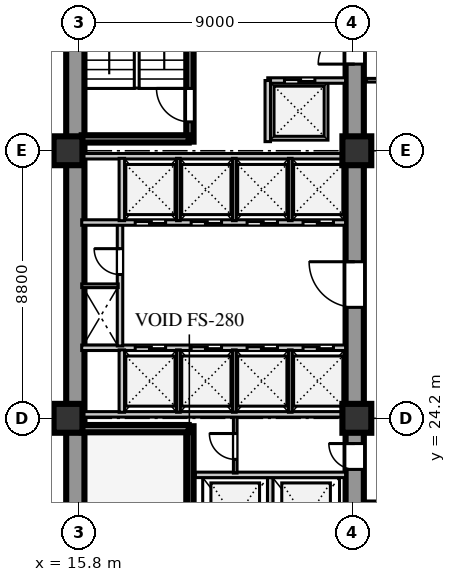
"""IFC4 building model, lengths in metres.
Left out: names, types, materials, properties, quantities, classifications, styles, units other than length and angle.
Written with IfcOpenShell. Run it as: python <this file> out.ifc"""

import sys

from ifc_helpers import new_model, si_unit, direction, frame, frame_2d, origin, origin_2d, place, context, subcontext, project, spatial, rectangle, extrude, element, fill, save


model = new_model("IFC4")
c1 = context("Model", 3, precision=1e-05, world=origin(), true_north=direction((0.0, 1.0)))
c2 = subcontext(c1, "Body", "Model", "MODEL_VIEW")
j1 = project(units=[si_unit("LENGTHUNIT", "METRE"), si_unit("PLANEANGLEUNIT", "RADIAN")], contexts=[c1])
p1 = place(None, origin())
s1 = spatial("IfcSite", under=j1, at=p1, CompositionType="ELEMENT")
p2 = place(p1, origin())
s2 = spatial("IfcBuilding", under=s1, at=p2, CompositionType="ELEMENT")
p3 = place(p2, frame((0.0, 0.0, 26.0)))
s3 = spatial("IfcBuildingStorey", under=s2, at=p3, CompositionType="ELEMENT", Elevation=26.0)
p4 = place(p3, frame((15.69, 15.81, 0.0), z_axis=(0.0, 0.0, 1.0), x_axis=(0.0, 1.0, 0.0)))
e1 = element("IfcWall", 1, at=p4, inside=s3, PredefinedType="SHEAR", context=c2, shape_type="SweptSolid", body=[
    extrude(rectangle(XDim=25.63, YDim=0.6, at=frame_2d((12.815, 0.0))), origin(), (0.0, 0.0, 1.0), 3.72),
])
p5 = place(p3, frame((24.88, 15.74, 0.0), z_axis=(0.0, 0.0, 1.0), x_axis=(0.0, 1.0, 0.0)))
e2 = element("IfcWall", 2, at=p5, inside=s3, PredefinedType="SHEAR", context=c2, shape_type="SweptSolid", body=[
    extrude(rectangle(XDim=25.76, YDim=0.6, at=frame_2d((12.88, 0.0))), origin(), (0.0, 0.0, 1.0), 3.72),
])
p6 = place(p5, frame((1.61, 0.0, 0.0)))
e3 = element("IfcOpeningElement", 3, at=p6, cuts=e2, PredefinedType="OPENING", context=c2, shape_type="SweptSolid", body=[
    extrude(rectangle(XDim=1.2, YDim=2.1, at=frame_2d((0.6, 1.05))), frame((0.0, 0.31, 0.0), z_axis=(0.0, -1.0, 0.0), x_axis=(1.0, 0.0, 0.0)), (0.0, 0.0, 1.0), 0.62),
])
p7 = place(p5, frame((6.78, 0.0, 0.0)))
e4 = element("IfcOpeningElement", 4, at=p7, cuts=e2, PredefinedType="OPENING", context=c2, shape_type="SweptSolid", body=[
    extrude(rectangle(XDim=0.85, YDim=2.06, at=frame_2d((0.425, 1.03))), frame((0.0, 0.31, 0.0), z_axis=(0.0, -1.0, 0.0), x_axis=(1.0, 0.0, 0.0)), (0.0, 0.0, 1.0), 0.62),
])
p8 = place(p5, frame((12.11, 0.0, 0.0)))
e5 = element("IfcOpeningElement", 5, at=p8, cuts=e2, PredefinedType="OPENING", context=c2, shape_type="SweptSolid", body=[
    extrude(rectangle(XDim=1.5, YDim=2.12, at=frame_2d((0.75, 1.06))), frame((0.0, 0.31, 0.0), z_axis=(0.0, -1.0, 0.0), x_axis=(1.0, 0.0, 0.0)), (0.0, 0.0, 1.0), 0.62),
])
p9 = place(p5, frame((20.11, 0.0, 0.0)))
e6 = element("IfcOpeningElement", 6, at=p9, cuts=e2, PredefinedType="OPENING", context=c2, shape_type="SweptSolid", body=[
    extrude(rectangle(XDim=1.2, YDim=2.12, at=frame_2d((0.6, 1.06))), frame((0.0, 0.31, 0.0), z_axis=(0.0, -1.0, 0.0), x_axis=(1.0, 0.0, 0.0)), (0.0, 0.0, 1.0), 0.62),
])
p10 = place(p5, frame((24.01, 0.0, 0.0)))
e7 = element("IfcOpeningElement", 7, at=p10, cuts=e2, PredefinedType="OPENING", context=c2, shape_type="SweptSolid", body=[
    extrude(rectangle(XDim=0.95, YDim=2.1, at=frame_2d((0.475, 1.05))), frame((0.0, 0.31, 0.0), z_axis=(0.0, -1.0, 0.0), x_axis=(1.0, 0.0, 0.0)), (0.0, 0.0, 1.0), 0.62),
])
for number, where, z_axis, x_axis in (
    (8, (15.45, 24.2, 0.0), (0.0, 0.0, 1.0), (1.0, 0.0, 0.0)),
    (9, (15.45, 33.0, 0.0), (0.0, 0.0, 1.0), (1.0, 0.0, 0.0)),
    (10, (24.95, 24.2, 0.0), (0.0, 0.0, 1.0), (1.0, 0.0, 0.0)),
    (11, (24.95, 33.0, 0.0), (0.0, 0.0, 1.0), (1.0, 0.0, 0.0)),
):
    element("IfcColumn", number, at=place(p3, frame(where, z_axis=z_axis, x_axis=x_axis)), inside=s3, PredefinedType="COLUMN", context=c2, shape_type="SweptSolid", body=[
        extrude(rectangle(XDim=0.95, YDim=0.95, at=origin_2d()), origin(), (0.0, 0.0, 1.0), 3.72),
    ])
p11 = place(p3, frame((19.46, 15.74, 0.0), z_axis=(0.0, 0.0, 1.0), x_axis=(0.0, 1.0, 0.0)))
e12 = element("IfcWall", 12, at=p11, inside=s3, PredefinedType="SHEAR", context=c2, shape_type="SweptSolid", body=[
    extrude(rectangle(XDim=8.2, YDim=0.24, at=frame_2d((4.1, 0.0))), origin(), (0.0, 0.0, 1.0), 4.0),
])
p12 = place(p11, frame((0.45, 0.0, 0.0)))
e13 = element("IfcOpeningElement", 13, at=p12, cuts=e12, PredefinedType="OPENING", context=c2, shape_type="SweptSolid", body=[
    extrude(rectangle(XDim=1.1, YDim=2.1, at=frame_2d((0.55, 1.05))), frame((0.0, 0.13, 0.0), z_axis=(0.0, -1.0, 0.0), x_axis=(1.0, 0.0, 0.0)), (0.0, 0.0, 1.0), 0.26),
])
p13 = place(p3, frame((15.9, 23.86, 0.0), z_axis=(0.0, 0.0, 1.0), x_axis=(1.0, 0.0, 0.0)))
e14 = element("IfcWall", 14, at=p13, inside=s3, PredefinedType="SHEAR", context=c2, shape_type="SweptSolid", body=[
    extrude(rectangle(XDim=3.52, YDim=0.24, at=frame_2d((1.76, 0.0))), origin(), (0.0, 0.0, 1.0), 4.0),
])
p14 = place(p3, frame((22.1, 19.51, 0.0), z_axis=(0.0, 0.0, 1.0), x_axis=(0.0, 1.0, 0.0)))
e15 = element("IfcWall", 15, at=p14, inside=s3, PredefinedType="SOLIDWALL", context=c2, shape_type="SweptSolid", body=[
    extrude(rectangle(XDim=2.74, YDim=0.18, at=frame_2d((1.37, 0.0))), origin(), (0.0, 0.0, 1.0), 3.72),
])
p15 = place(p3, frame((19.64, 22.34, 0.0), z_axis=(0.0, 0.0, 1.0), x_axis=(1.0, 0.0, 0.0)))
e16 = element("IfcWall", 16, at=p15, inside=s3, PredefinedType="SOLIDWALL", context=c2, shape_type="SweptSolid", body=[
    extrude(rectangle(XDim=4.94, YDim=0.18, at=frame_2d((2.47, 0.0))), origin(), (0.0, 0.0, 1.0), 3.72),
])
p16 = place(p3, frame((20.95, 22.4, 0.0), z_axis=(0.0, 0.0, 1.0), x_axis=(0.0, 1.0, 0.0)))
e17 = element("IfcWall", 17, at=p16, inside=s3, PredefinedType="PARTITIONING", context=c2, shape_type="SweptSolid", body=[
    extrude(rectangle(XDim=1.88, YDim=0.12, at=frame_2d((0.94, 0.0))), origin(), (0.0, 0.0, 1.0), 3.72),
])
p17 = place(p16, frame((0.45, 0.0, 0.0)))
e18 = element("IfcOpeningElement", 18, at=p17, cuts=e17, PredefinedType="OPENING", context=c2, shape_type="SweptSolid", body=[
    extrude(rectangle(XDim=0.85, YDim=2.06, at=frame_2d((0.425, 1.03))), frame((0.0, 0.07, 0.0), z_axis=(0.0, -1.0, 0.0), x_axis=(1.0, 0.0, 0.0)), (0.0, 0.0, 1.0), 0.14),
])
p18 = place(p3, frame((15.9, 26.52, 0.0), z_axis=(0.0, 0.0, 1.0), x_axis=(1.0, 0.0, 0.0)))
e19 = element("IfcWall", 19, at=p18, inside=s3, PredefinedType="SOLIDWALL", context=c2, shape_type="SweptSolid", body=[
    extrude(rectangle(XDim=8.68, YDim=0.18, at=frame_2d((4.34, 0.0))), origin(), (0.0, 0.0, 1.0), 3.72),
])
p19 = place(p18, frame((1.76, 0.0, 0.0)))
e20 = element("IfcOpeningElement", 20, at=p19, cuts=e19, PredefinedType="OPENING", context=c2, shape_type="SweptSolid", body=[
    extrude(rectangle(XDim=1.0, YDim=2.1, at=frame_2d((0.5, 1.05))), frame((0.0, 0.1, 0.0), z_axis=(0.0, -1.0, 0.0), x_axis=(1.0, 0.0, 0.0)), (0.0, 0.0, 1.0), 0.2),
])
p20 = place(p18, frame((3.6, 0.0, 0.0)))
e21 = element("IfcOpeningElement", 21, at=p20, cuts=e19, PredefinedType="OPENING", context=c2, shape_type="SweptSolid", body=[
    extrude(rectangle(XDim=1.0, YDim=2.1, at=frame_2d((0.5, 1.05))), frame((0.0, 0.1, 0.0), z_axis=(0.0, -1.0, 0.0), x_axis=(1.0, 0.0, 0.0)), (0.0, 0.0, 1.0), 0.2),
])
p21 = place(p18, frame((5.44, 0.0, 0.0)))
e22 = element("IfcOpeningElement", 22, at=p21, cuts=e19, PredefinedType="OPENING", context=c2, shape_type="SweptSolid", body=[
    extrude(rectangle(XDim=1.0, YDim=2.1, at=frame_2d((0.5, 1.05))), frame((0.0, 0.1, 0.0), z_axis=(0.0, -1.0, 0.0), x_axis=(1.0, 0.0, 0.0)), (0.0, 0.0, 1.0), 0.2),
])
p22 = place(p18, frame((7.28, 0.0, 0.0)))
e23 = element("IfcOpeningElement", 23, at=p22, cuts=e19, PredefinedType="OPENING", context=c2, shape_type="SweptSolid", body=[
    extrude(rectangle(XDim=1.0, YDim=2.1, at=frame_2d((0.5, 1.05))), frame((0.0, 0.1, 0.0), z_axis=(0.0, -1.0, 0.0), x_axis=(1.0, 0.0, 0.0)), (0.0, 0.0, 1.0), 0.2),
])
p23 = place(p3, frame((15.9, 24.33, 0.0), z_axis=(0.0, 0.0, 1.0), x_axis=(1.0, 0.0, 0.0)))
e24 = element("IfcWall", 24, at=p23, inside=s3, PredefinedType="SOLIDWALL", context=c2, shape_type="SweptSolid", body=[
    extrude(rectangle(XDim=8.68, YDim=0.18, at=frame_2d((4.34, 0.0))), origin(), (0.0, 0.0, 1.0), 3.02),
])
p24 = place(p3, frame((17.22, 24.4, 0.0), z_axis=(0.0, 0.0, 1.0), x_axis=(0.0, 1.0, 0.0)))
e25 = element("IfcWall", 25, at=p24, inside=s3, PredefinedType="SOLIDWALL", context=c2, shape_type="SweptSolid", body=[
    extrude(rectangle(XDim=2.05, YDim=0.18, at=frame_2d((1.025, 0.0))), origin(), (0.0, 0.0, 1.0), 3.72),
])
for number, where, z_axis, x_axis in (
    (26, (19.08, 24.4, 0.0), (0.0, 0.0, 1.0), (0.0, 1.0, 0.0)),
    (27, (20.92, 24.4, 0.0), (0.0, 0.0, 1.0), (0.0, 1.0, 0.0)),
    (28, (22.76, 24.4, 0.0), (0.0, 0.0, 1.0), (0.0, 1.0, 0.0)),
):
    element("IfcWall", number, at=place(p3, frame(where, z_axis=z_axis, x_axis=x_axis)), inside=s3, PredefinedType="PARTITIONING", context=c2, shape_type="SweptSolid", body=[
        extrude(rectangle(XDim=2.05, YDim=0.12, at=frame_2d((1.025, 0.0))), origin(), (0.0, 0.0, 1.0), 3.72),
    ])
p25 = place(p3, frame((17.16, 26.58, 0.0), z_axis=(0.0, 0.0, 1.0), x_axis=(0.0, 1.0, 0.0)))
e29 = element("IfcWall", 29, at=p25, inside=s3, PredefinedType="SOLIDWALL", context=c2, shape_type="SweptSolid", body=[
    extrude(rectangle(XDim=4.02, YDim=0.18, at=frame_2d((2.01, 0.0))), origin(), (0.0, 0.0, 1.0), 3.72),
])
p26 = place(p25, frame((2.35, 0.0, 0.0)))
e30 = element("IfcOpeningElement", 30, at=p26, cuts=e29, PredefinedType="OPENING", context=c2, shape_type="SweptSolid", body=[
    extrude(rectangle(XDim=0.85, YDim=2.06, at=frame_2d((0.425, 1.03))), frame((0.0, 0.1, 0.0), z_axis=(0.0, -1.0, 0.0), x_axis=(1.0, 0.0, 0.0)), (0.0, 0.0, 1.0), 0.2),
])
p27 = place(p3, frame((15.9, 28.56, 0.0), z_axis=(0.0, 0.0, 1.0), x_axis=(1.0, 0.0, 0.0)))
e31 = element("IfcWall", 31, at=p27, inside=s3, PredefinedType="PARTITIONING", context=c2, shape_type="SweptSolid", body=[
    extrude(rectangle(XDim=1.2, YDim=0.12, at=frame_2d((0.6, 0.0))), origin(), (0.0, 0.0, 1.0), 3.72),
])
p28 = place(p3, frame((15.9, 30.64, 0.0), z_axis=(0.0, 0.0, 1.0), x_axis=(1.0, 0.0, 0.0)))
e32 = element("IfcWall", 32, at=p28, inside=s3, PredefinedType="SOLIDWALL", context=c2, shape_type="SweptSolid", body=[
    extrude(rectangle(XDim=8.68, YDim=0.18, at=frame_2d((4.34, 0.0))), origin(), (0.0, 0.0, 1.0), 3.72),
])
p29 = place(p28, frame((1.76, 0.0, 0.0)))
e33 = element("IfcOpeningElement", 33, at=p29, cuts=e32, PredefinedType="OPENING", context=c2, shape_type="SweptSolid", body=[
    extrude(rectangle(XDim=1.0, YDim=2.1, at=frame_2d((0.5, 1.05))), frame((0.0, 0.1, 0.0), z_axis=(0.0, -1.0, 0.0), x_axis=(1.0, 0.0, 0.0)), (0.0, 0.0, 1.0), 0.2),
])
p30 = place(p28, frame((3.6, 0.0, 0.0)))
e34 = element("IfcOpeningElement", 34, at=p30, cuts=e32, PredefinedType="OPENING", context=c2, shape_type="SweptSolid", body=[
    extrude(rectangle(XDim=1.0, YDim=2.1, at=frame_2d((0.5, 1.05))), frame((0.0, 0.1, 0.0), z_axis=(0.0, -1.0, 0.0), x_axis=(1.0, 0.0, 0.0)), (0.0, 0.0, 1.0), 0.2),
])
p31 = place(p28, frame((5.44, 0.0, 0.0)))
e35 = element("IfcOpeningElement", 35, at=p31, cuts=e32, PredefinedType="OPENING", context=c2, shape_type="SweptSolid", body=[
    extrude(rectangle(XDim=1.0, YDim=2.1, at=frame_2d((0.5, 1.05))), frame((0.0, 0.1, 0.0), z_axis=(0.0, -1.0, 0.0), x_axis=(1.0, 0.0, 0.0)), (0.0, 0.0, 1.0), 0.2),
])
p32 = place(p28, frame((7.28, 0.0, 0.0)))
e36 = element("IfcOpeningElement", 36, at=p32, cuts=e32, PredefinedType="OPENING", context=c2, shape_type="SweptSolid", body=[
    extrude(rectangle(XDim=1.0, YDim=2.1, at=frame_2d((0.5, 1.05))), frame((0.0, 0.1, 0.0), z_axis=(0.0, -1.0, 0.0), x_axis=(1.0, 0.0, 0.0)), (0.0, 0.0, 1.0), 0.2),
])
p33 = place(p3, frame((15.9, 32.82, 0.0), z_axis=(0.0, 0.0, 1.0), x_axis=(1.0, 0.0, 0.0)))
e37 = element("IfcWall", 37, at=p33, inside=s3, PredefinedType="SOLIDWALL", context=c2, shape_type="SweptSolid", body=[
    extrude(rectangle(XDim=8.68, YDim=0.18, at=frame_2d((4.34, 0.0))), origin(), (0.0, 0.0, 1.0), 3.02),
])
p34 = place(p3, frame((17.22, 30.7, 0.0), z_axis=(0.0, 0.0, 1.0), x_axis=(0.0, 1.0, 0.0)))
e38 = element("IfcWall", 38, at=p34, inside=s3, PredefinedType="SOLIDWALL", context=c2, shape_type="SweptSolid", body=[
    extrude(rectangle(XDim=2.05, YDim=0.18, at=frame_2d((1.025, 0.0))), origin(), (0.0, 0.0, 1.0), 3.72),
])
for number, where, z_axis, x_axis in (
    (39, (19.08, 30.7, 0.0), (0.0, 0.0, 1.0), (0.0, 1.0, 0.0)),
    (40, (20.92, 30.7, 0.0), (0.0, 0.0, 1.0), (0.0, 1.0, 0.0)),
    (41, (22.76, 30.7, 0.0), (0.0, 0.0, 1.0), (0.0, 1.0, 0.0)),
):
    element("IfcWall", number, at=place(p3, frame(where, z_axis=z_axis, x_axis=x_axis)), inside=s3, PredefinedType="PARTITIONING", context=c2, shape_type="SweptSolid", body=[
        extrude(rectangle(XDim=2.05, YDim=0.12, at=frame_2d((1.025, 0.0))), origin(), (0.0, 0.0, 1.0), 3.72),
    ])
p35 = place(p3, frame((19.46, 33.3, 0.0), z_axis=(0.0, 0.0, 1.0), x_axis=(0.0, 1.0, 0.0)))
e42 = element("IfcWall", 42, at=p35, inside=s3, PredefinedType="SHEAR", context=c2, shape_type="SweptSolid", body=[
    extrude(rectangle(XDim=8.18, YDim=0.24, at=frame_2d((4.09, 0.0))), origin(), (0.0, 0.0, 1.0), 4.0),
])
p36 = place(p35, frame((0.65, 0.0, 0.0)))
e43 = element("IfcOpeningElement", 43, at=p36, cuts=e42, PredefinedType="OPENING", context=c2, shape_type="SweptSolid", body=[
    extrude(rectangle(XDim=1.1, YDim=2.1, at=frame_2d((0.55, 1.05))), frame((0.0, 0.13, 0.0), z_axis=(0.0, -1.0, 0.0), x_axis=(1.0, 0.0, 0.0)), (0.0, 0.0, 1.0), 0.26),
])
p37 = place(p3, frame((15.9, 33.39, 0.0), z_axis=(0.0, 0.0, 1.0), x_axis=(1.0, 0.0, 0.0)))
e44 = element("IfcWall", 44, at=p37, inside=s3, PredefinedType="SHEAR", context=c2, shape_type="SweptSolid", body=[
    extrude(rectangle(XDim=3.52, YDim=0.24, at=frame_2d((1.76, 0.0))), origin(), (0.0, 0.0, 1.0), 4.0),
])
p38 = place(p3, frame((22.02, 35.31, 0.0), z_axis=(0.0, 0.0, 1.0), x_axis=(1.0, 0.0, 0.0)))
e45 = element("IfcWall", 45, at=p38, inside=s3, PredefinedType="SOLIDWALL", context=c2, shape_type="SweptSolid", body=[
    extrude(rectangle(XDim=2.56, YDim=0.18, at=frame_2d((1.28, 0.0))), origin(), (0.0, 0.0, 1.0), 3.72),
])
p39 = place(p38, frame((0.55, 0.0, 0.0)))
e46 = element("IfcOpeningElement", 46, at=p39, cuts=e45, PredefinedType="OPENING", context=c2, shape_type="SweptSolid", body=[
    extrude(rectangle(XDim=1.0, YDim=2.1, at=frame_2d((0.5, 1.05))), frame((0.0, 0.1, 0.0), z_axis=(0.0, -1.0, 0.0), x_axis=(1.0, 0.0, 0.0)), (0.0, 0.0, 1.0), 0.2),
])
p40 = place(p3, frame((22.02, 33.3, 0.0), z_axis=(0.0, 0.0, 1.0), x_axis=(0.0, 1.0, 0.0)))
e47 = element("IfcWall", 47, at=p40, inside=s3, PredefinedType="SOLIDWALL", context=c2, shape_type="SweptSolid", body=[
    extrude(rectangle(XDim=2.01, YDim=0.18, at=frame_2d((1.005, 0.0))), origin(), (0.0, 0.0, 1.0), 3.72),
])
p41 = place(p3, frame((25.25, 21.42, 0.0), z_axis=(0.0, 0.0, 1.0), x_axis=(1.0, 0.0, 0.0)))
e48 = element("IfcWall", 48, at=p41, inside=s3, PredefinedType="PARTITIONING", context=c2, shape_type="SweptSolid", body=[
    extrude(rectangle(XDim=12.87, YDim=0.12, at=frame_2d((6.435, 0.0))), origin(), (0.0, 0.0, 1.0), 3.32),
])
p42 = place(p41, frame((5.945, 0.0, 0.0)))
e49 = element("IfcOpeningElement", 49, at=p42, cuts=e48, PredefinedType="OPENING", context=c2, shape_type="SweptSolid", body=[
    extrude(rectangle(XDim=0.95, YDim=2.08, at=frame_2d((0.475, 1.04))), frame((0.0, 0.07, 0.0), z_axis=(0.0, -1.0, 0.0), x_axis=(1.0, 0.0, 0.0)), (0.0, 0.0, 1.0), 0.14),
])
p43 = place(p3, frame((25.25, 35.32, 0.0), z_axis=(0.0, 0.0, 1.0), x_axis=(1.0, 0.0, 0.0)))
e50 = element("IfcWall", 50, at=p43, inside=s3, PredefinedType="PARTITIONING", context=c2, shape_type="SweptSolid", body=[
    extrude(rectangle(XDim=9.47, YDim=0.12, at=frame_2d((4.735, 0.0))), origin(), (0.0, 0.0, 1.0), 3.72),
])
p44 = place(p43, frame((4.265, 0.0, 0.0)))
e51 = element("IfcOpeningElement", 51, at=p44, cuts=e50, PredefinedType="OPENING", context=c2, shape_type="SweptSolid", body=[
    extrude(rectangle(XDim=0.95, YDim=2.08, at=frame_2d((0.475, 1.04))), frame((0.0, 0.07, 0.0), z_axis=(0.0, -1.0, 0.0), x_axis=(1.0, 0.0, 0.0)), (0.0, 0.0, 1.0), 0.14),
])
p45 = place(p17, origin())
e52 = element("IfcDoor", 52, at=p45, inside=s3, OperationType="SINGLE_SWING_RIGHT", PredefinedType="DOOR", context=c2, shape_type="SweptSolid", body=[
    extrude(rectangle(XDim=0.85, YDim=2.06, at=frame_2d((0.425, 1.03))), frame((0.0, 0.025, 0.0), z_axis=(0.0, -1.0, 0.0), x_axis=(1.0, 0.0, 0.0)), (0.0, 0.0, 1.0), 0.05),
])
fill(e18, e52)
p46 = place(p7, frame((0.85, 0.0, 0.0), z_axis=(0.0, 0.0, 1.0), x_axis=(-1.0, 0.0, 0.0)))
e53 = element("IfcDoor", 53, at=p46, inside=s3, OperationType="SINGLE_SWING_LEFT", PredefinedType="DOOR", context=c2, shape_type="SweptSolid", body=[
    extrude(rectangle(XDim=0.85, YDim=2.06, at=frame_2d((0.425, 1.03))), frame((0.0, 0.025, 0.0), z_axis=(0.0, -1.0, 0.0), x_axis=(1.0, 0.0, 0.0)), (0.0, 0.0, 1.0), 0.05),
])
fill(e4, e53)
p47 = place(p19, origin())
e54 = element("IfcDoor", 54, at=p47, inside=s3, OperationType="DOUBLE_DOOR_SLIDING", PredefinedType="DOOR", context=c2, shape_type="SweptSolid", body=[
    extrude(rectangle(XDim=1.0, YDim=2.1, at=frame_2d((0.5, 1.05))), frame((0.0, 0.025, 0.0), z_axis=(0.0, -1.0, 0.0), x_axis=(1.0, 0.0, 0.0)), (0.0, 0.0, 1.0), 0.05),
])
fill(e20, e54)
p48 = place(p20, origin())
e55 = element("IfcDoor", 55, at=p48, inside=s3, OperationType="DOUBLE_DOOR_SLIDING", PredefinedType="DOOR", context=c2, shape_type="SweptSolid", body=[
    extrude(rectangle(XDim=1.0, YDim=2.1, at=frame_2d((0.5, 1.05))), frame((0.0, 0.025, 0.0), z_axis=(0.0, -1.0, 0.0), x_axis=(1.0, 0.0, 0.0)), (0.0, 0.0, 1.0), 0.05),
])
fill(e21, e55)
p49 = place(p21, origin())
e56 = element("IfcDoor", 56, at=p49, inside=s3, OperationType="DOUBLE_DOOR_SLIDING", PredefinedType="DOOR", context=c2, shape_type="SweptSolid", body=[
    extrude(rectangle(XDim=1.0, YDim=2.1, at=frame_2d((0.5, 1.05))), frame((0.0, 0.025, 0.0), z_axis=(0.0, -1.0, 0.0), x_axis=(1.0, 0.0, 0.0)), (0.0, 0.0, 1.0), 0.05),
])
fill(e22, e56)
p50 = place(p22, origin())
e57 = element("IfcDoor", 57, at=p50, inside=s3, OperationType="DOUBLE_DOOR_SLIDING", PredefinedType="DOOR", context=c2, shape_type="SweptSolid", body=[
    extrude(rectangle(XDim=1.0, YDim=2.1, at=frame_2d((0.5, 1.05))), frame((0.0, 0.025, 0.0), z_axis=(0.0, -1.0, 0.0), x_axis=(1.0, 0.0, 0.0)), (0.0, 0.0, 1.0), 0.05),
])
fill(e23, e57)
p51 = place(p26, origin())
e58 = element("IfcDoor", 58, at=p51, inside=s3, OperationType="SINGLE_SWING_RIGHT", PredefinedType="DOOR", context=c2, shape_type="SweptSolid", body=[
    extrude(rectangle(XDim=0.85, YDim=2.06, at=frame_2d((0.425, 1.03))), frame((0.0, 0.025, 0.0), z_axis=(0.0, -1.0, 0.0), x_axis=(1.0, 0.0, 0.0)), (0.0, 0.0, 1.0), 0.05),
])
fill(e30, e58)
p52 = place(p8, frame((1.5, 0.0, 0.0), z_axis=(0.0, 0.0, 1.0), x_axis=(-1.0, 0.0, 0.0)))
e59 = element("IfcDoor", 59, at=p52, inside=s3, OperationType="SINGLE_SWING_LEFT", PredefinedType="DOOR", context=c2, shape_type="SweptSolid", body=[
    extrude(rectangle(XDim=1.5, YDim=2.12, at=frame_2d((0.75, 1.06))), frame((0.0, 0.025, 0.0), z_axis=(0.0, -1.0, 0.0), x_axis=(1.0, 0.0, 0.0)), (0.0, 0.0, 1.0), 0.05),
])
fill(e5, e59)
p53 = place(p29, frame((1.0, 0.0, 0.0), z_axis=(0.0, 0.0, 1.0), x_axis=(-1.0, 0.0, 0.0)))
e60 = element("IfcDoor", 60, at=p53, inside=s3, OperationType="DOUBLE_DOOR_SLIDING", PredefinedType="DOOR", context=c2, shape_type="SweptSolid", body=[
    extrude(rectangle(XDim=1.0, YDim=2.1, at=frame_2d((0.5, 1.05))), frame((0.0, 0.025, 0.0), z_axis=(0.0, -1.0, 0.0), x_axis=(1.0, 0.0, 0.0)), (0.0, 0.0, 1.0), 0.05),
])
fill(e33, e60)
p54 = place(p30, frame((1.0, 0.0, 0.0), z_axis=(0.0, 0.0, 1.0), x_axis=(-1.0, 0.0, 0.0)))
e61 = element("IfcDoor", 61, at=p54, inside=s3, OperationType="DOUBLE_DOOR_SLIDING", PredefinedType="DOOR", context=c2, shape_type="SweptSolid", body=[
    extrude(rectangle(XDim=1.0, YDim=2.1, at=frame_2d((0.5, 1.05))), frame((0.0, 0.025, 0.0), z_axis=(0.0, -1.0, 0.0), x_axis=(1.0, 0.0, 0.0)), (0.0, 0.0, 1.0), 0.05),
])
fill(e34, e61)
p55 = place(p31, frame((1.0, 0.0, 0.0), z_axis=(0.0, 0.0, 1.0), x_axis=(-1.0, 0.0, 0.0)))
e62 = element("IfcDoor", 62, at=p55, inside=s3, OperationType="DOUBLE_DOOR_SLIDING", PredefinedType="DOOR", context=c2, shape_type="SweptSolid", body=[
    extrude(rectangle(XDim=1.0, YDim=2.1, at=frame_2d((0.5, 1.05))), frame((0.0, 0.025, 0.0), z_axis=(0.0, -1.0, 0.0), x_axis=(1.0, 0.0, 0.0)), (0.0, 0.0, 1.0), 0.05),
])
fill(e35, e62)
p56 = place(p32, frame((1.0, 0.0, 0.0), z_axis=(0.0, 0.0, 1.0), x_axis=(-1.0, 0.0, 0.0)))
e63 = element("IfcDoor", 63, at=p56, inside=s3, OperationType="DOUBLE_DOOR_SLIDING", PredefinedType="DOOR", context=c2, shape_type="SweptSolid", body=[
    extrude(rectangle(XDim=1.0, YDim=2.1, at=frame_2d((0.5, 1.05))), frame((0.0, 0.025, 0.0), z_axis=(0.0, -1.0, 0.0), x_axis=(1.0, 0.0, 0.0)), (0.0, 0.0, 1.0), 0.05),
])
fill(e36, e63)
p57 = place(p36, origin())
e64 = element("IfcDoor", 64, at=p57, inside=s3, OperationType="SINGLE_SWING_RIGHT", PredefinedType="DOOR", context=c2, shape_type="SweptSolid", body=[
    extrude(rectangle(XDim=1.1, YDim=2.1, at=frame_2d((0.55, 1.05))), frame((0.0, 0.025, 0.0), z_axis=(0.0, -1.0, 0.0), x_axis=(1.0, 0.0, 0.0)), (0.0, 0.0, 1.0), 0.05),
])
fill(e43, e64)
p58 = place(p9, frame((1.2, 0.0, 0.0), z_axis=(0.0, 0.0, 1.0), x_axis=(-1.0, 0.0, 0.0)))
e65 = element("IfcDoor", 65, at=p58, inside=s3, OperationType="SINGLE_SWING_RIGHT", PredefinedType="DOOR", context=c2, shape_type="SweptSolid", body=[
    extrude(rectangle(XDim=1.2, YDim=2.12, at=frame_2d((0.6, 1.06))), frame((0.0, 0.025, 0.0), z_axis=(0.0, -1.0, 0.0), x_axis=(1.0, 0.0, 0.0)), (0.0, 0.0, 1.0), 0.05),
])
fill(e6, e65)
p59 = place(p39, origin())
e66 = element("IfcDoor", 66, at=p59, inside=s3, OperationType="DOUBLE_DOOR_SLIDING", PredefinedType="DOOR", context=c2, shape_type="SweptSolid", body=[
    extrude(rectangle(XDim=1.0, YDim=2.1, at=frame_2d((0.5, 1.05))), frame((0.0, 0.025, 0.0), z_axis=(0.0, -1.0, 0.0), x_axis=(1.0, 0.0, 0.0)), (0.0, 0.0, 1.0), 0.05),
])
fill(e46, e66)
save(model, sys.argv[1])
